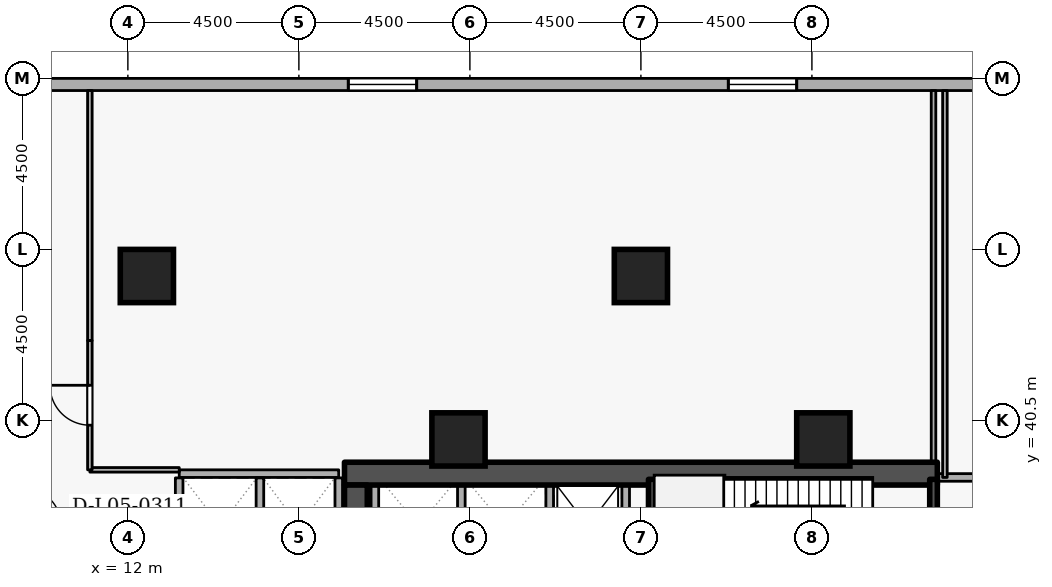
"""IFC4 building model, lengths in metres.
Left out: names, types, materials, properties, quantities, classifications, styles, units other than length and angle.
Written with IfcOpenShell. Run it as: python <this file> out.ifc"""

import sys

from ifc_helpers import new_model, si_unit, direction, frame, frame_2d, origin, origin_2d, place, context, subcontext, project, spatial, rectangle, extrude, element, fill, save


model = new_model("IFC4")
c1 = context("Model", 3, precision=1e-05, world=origin(), true_north=direction((0.0, 1.0)))
c2 = subcontext(c1, "Body", "Model", "MODEL_VIEW")
j1 = project(units=[si_unit("LENGTHUNIT", "METRE"), si_unit("PLANEANGLEUNIT", "RADIAN")], contexts=[c1])
p1 = place(None, origin())
s1 = spatial("IfcSite", under=j1, at=p1, CompositionType="ELEMENT")
p2 = place(p1, origin())
s2 = spatial("IfcBuilding", under=s1, at=p2, CompositionType="ELEMENT")
p3 = place(p2, frame((0.0, 0.0, 23.1)))
s3 = spatial("IfcBuildingStorey", under=s2, at=p3, CompositionType="ELEMENT", Elevation=23.1)
p4 = place(p3, frame((17.7, 39.1, 0.0), z_axis=(0.0, 0.0, 1.0), x_axis=(1.0, 0.0, 0.0)))
e1 = element("IfcWall", 1, at=p4, inside=s3, PredefinedType="SHEAR", context=c2, shape_type="SweptSolid", body=[
    extrude(rectangle(XDim=15.6, YDim=0.6, at=frame_2d((7.8, 0.0))), origin(), (0.0, 0.0, 1.0), 4.8),
])
p5 = place(p3, frame((18.0, 33.1, 0.0), z_axis=(0.0, 0.0, 1.0), x_axis=(0.0, 1.0, 0.0)))
e2 = element("IfcWall", 2, at=p5, inside=s3, PredefinedType="SHEAR", context=c2, shape_type="SweptSolid", body=[
    extrude(rectangle(XDim=5.7, YDim=0.6, at=frame_2d((2.85, 0.0))), origin(), (0.0, 0.0, 1.0), 4.8),
])
for number, where, z_axis, x_axis in (
    (3, (12.5, 44.3, 0.0), (0.0, 0.0, 1.0), (1.0, 0.0, 0.0)),
    (4, (25.5, 44.3, 0.0), (0.0, 0.0, 1.0), (1.0, 0.0, 0.0)),
    (5, (20.7, 40.0, 0.0), (0.0, 0.0, 1.0), (1.0, 0.0, 0.0)),
    (6, (30.3, 40.0, 0.0), (0.0, 0.0, 1.0), (1.0, 0.0, 0.0)),
):
    element("IfcColumn", number, at=place(p3, frame(where, z_axis=z_axis, x_axis=x_axis)), inside=s3, PredefinedType="COLUMN", context=c2, shape_type="SweptSolid", body=[
        extrude(rectangle(XDim=1.4, YDim=1.4, at=origin_2d()), origin(), (0.0, 0.0, 1.0), 4.8),
    ])
p6 = place(p3, frame((42.4, 49.34, 0.0), z_axis=(0.0, 0.0, 1.0), x_axis=(-1.0, 0.0, 0.0)))
e7 = element("IfcWall", 7, at=p6, inside=s3, PredefinedType="STANDARD", context=c2, shape_type="SweptSolid", body=[
    extrude(rectangle(XDim=39.4, YDim=0.32, at=frame_2d((19.7, 0.0))), origin(), (0.0, 0.0, 1.0), 2.84),
])
p7 = place(p6, frame((12.8, 0.0, 0.65)))
e8 = element("IfcOpeningElement", 8, at=p7, cuts=e7, PredefinedType="OPENING", context=c2, shape_type="SweptSolid", body=[
    extrude(rectangle(XDim=1.8, YDim=1.25, at=frame_2d((0.9, 0.625))), frame((0.0, 0.17, 0.0), z_axis=(0.0, -1.0, 0.0), x_axis=(1.0, 0.0, 0.0)), (0.0, 0.0, 1.0), 0.34),
])
p8 = place(p6, frame((22.8, 0.0, 0.65)))
e9 = element("IfcOpeningElement", 9, at=p8, cuts=e7, PredefinedType="OPENING", context=c2, shape_type="SweptSolid", body=[
    extrude(rectangle(XDim=1.8, YDim=1.25, at=frame_2d((0.9, 0.625))), frame((0.0, 0.17, 0.0), z_axis=(0.0, -1.0, 0.0), x_axis=(1.0, 0.0, 0.0)), (0.0, 0.0, 1.0), 0.34),
])
for number, where, z_axis, x_axis in (
    (10, (25.1, 36.352, 0.0), (0.0, 0.0, 1.0), (0.0, 1.0, 0.0)),
    (11, (23.1, 36.352, 0.0), (0.0, 0.0, 1.0), (0.0, 1.0, 0.0)),
    (12, (20.775, 36.352, 0.0), (0.0, 0.0, 1.0), (0.0, 1.0, 0.0)),
    (13, (18.5, 36.352, 0.0), (0.0, 0.0, 1.0), (0.0, 1.0, 0.0)),
):
    element("IfcWall", number, at=place(p3, frame(where, z_axis=z_axis, x_axis=x_axis)), inside=s3, PredefinedType="STANDARD", context=c2, shape_type="SweptSolid", body=[
        extrude(rectangle(XDim=2.436, YDim=0.2, at=frame_2d((1.218, 0.0))), origin(), (0.0, 0.0, 1.0), 4.54),
    ])
p9 = place(p3, frame((13.352, 39.1, 0.0), z_axis=(0.0, 0.0, 1.0), x_axis=(1.0, 0.0, 0.0)))
e14 = element("IfcWall", 14, at=p9, inside=s3, PredefinedType="STANDARD", context=c2, shape_type="SweptSolid", body=[
    extrude(rectangle(XDim=4.196, YDim=0.2, at=frame_2d((2.098, 0.0))), origin(), (0.0, 0.0, 1.0), 4.54),
])
p10 = place(p3, frame((17.55, 36.352, 0.0), z_axis=(0.0, 0.0, 1.0), x_axis=(0.0, 1.0, 0.0)))
e15 = element("IfcWall", 15, at=p10, inside=s3, PredefinedType="STANDARD", context=c2, shape_type="SweptSolid", body=[
    extrude(rectangle(XDim=2.636, YDim=0.2, at=frame_2d((1.318, 0.0))), origin(), (0.0, 0.0, 1.0), 3.745),
])
for number, where, z_axis, x_axis in (
    (16, (15.475, 36.352, 0.0), (0.0, 0.0, 1.0), (0.0, 1.0, 0.0)),
    (17, (13.35, 36.352, 0.0), (0.0, 0.0, 1.0), (0.0, 1.0, 0.0)),
):
    element("IfcWall", number, at=place(p3, frame(where, z_axis=z_axis, x_axis=x_axis)), inside=s3, PredefinedType="STANDARD", context=c2, shape_type="SweptSolid", body=[
        extrude(rectangle(XDim=2.636, YDim=0.2, at=frame_2d((1.318, 0.0))), origin(), (0.0, 0.0, 1.0), 4.54),
    ])
p11 = place(p3, frame((33.2, 38.95, 0.0), z_axis=(0.0, 0.0, 1.0), x_axis=(0.0, -1.0, 0.0)))
e18 = element("IfcWall", 18, at=p11, inside=s3, PredefinedType="SHEAR", context=c2, shape_type="SweptSolid", body=[
    extrude(rectangle(XDim=3.35, YDim=0.2, at=frame_2d((1.675, 0.0))), origin(), (0.0, 0.0, 1.0), 4.8),
])
p12 = place(p11, frame((1.125, 0.0, 0.0)))
e19 = element("IfcOpeningElement", 19, at=p12, cuts=e18, PredefinedType="OPENING", context=c2, shape_type="SweptSolid", body=[
    extrude(rectangle(XDim=1.1, YDim=2.1, at=frame_2d((0.55, 1.05))), frame((0.0, 0.11, 0.0), z_axis=(0.0, -1.0, 0.0), x_axis=(1.0, 0.0, 0.0)), (0.0, 0.0, 1.0), 0.22),
])
p13 = place(p3, frame((25.8, 35.6, 0.0), z_axis=(0.0, 0.0, 1.0), x_axis=(0.0, 1.0, 0.0)))
e20 = element("IfcWall", 20, at=p13, inside=s3, PredefinedType="SHEAR", context=c2, shape_type="SweptSolid", body=[
    extrude(rectangle(XDim=3.35, YDim=0.2, at=frame_2d((1.675, 0.0))), origin(), (0.0, 0.0, 1.0), 4.8),
])
p14 = place(p3, frame((35.8, 39.0, 0.0), z_axis=(0.0, 0.0, 1.0), x_axis=(-1.0, 0.0, 0.0)))
e21 = element("IfcWall", 21, at=p14, inside=s3, PredefinedType="STANDARD", context=c2, shape_type="SweptSolid", body=[
    extrude(rectangle(XDim=2.5, YDim=0.2, at=frame_2d((1.25, 0.0))), origin(), (0.0, 0.0, 1.0), 4.54),
])
p15 = place(p3, frame((33.5, 39.0, 0.0), z_axis=(0.0, 0.0, 1.0), x_axis=(0.0, 1.0, 0.0)))
e22 = element("IfcWall", 22, at=p15, inside=s3, PredefinedType="PARTITIONING", context=c2, shape_type="SweptSolid", body=[
    extrude(rectangle(XDim=10.18, YDim=0.12, at=frame_2d((5.09, 0.0))), origin(), (0.0, 0.0, 1.0), 4.54),
])
p16 = place(p3, frame((11.0, 42.6, 0.0), z_axis=(0.0, 0.0, 1.0), x_axis=(0.0, 1.0, 0.0)))
e23 = element("IfcWall", 23, at=p16, inside=s3, PredefinedType="PARTITIONING", context=c2, shape_type="SweptSolid", body=[
    extrude(rectangle(XDim=6.58, YDim=0.12, at=frame_2d((3.29, 0.0))), origin(), (0.0, 0.0, 1.0), 4.54),
])
p17 = place(p3, frame((33.2, 49.18, 0.0), z_axis=(0.0, 0.0, 1.0), x_axis=(0.0, -1.0, 0.0)))
e24 = element("IfcWall", 24, at=p17, inside=s3, PredefinedType="PARTITIONING", context=c2, shape_type="SweptSolid", body=[
    extrude(rectangle(XDim=9.98, YDim=0.12, at=frame_2d((4.99, 0.0))), origin(), (0.0, 0.0, 1.0), 4.54),
])
p18 = place(p3, frame((13.352, 39.2, 0.0), z_axis=(0.0, 0.0, 1.0), x_axis=(-1.0, 0.0, 0.0)))
e25 = element("IfcWall", 25, at=p18, inside=s3, PredefinedType="PARTITIONING", context=c2, shape_type="SweptSolid", body=[
    extrude(rectangle(XDim=2.352, YDim=0.12, at=frame_2d((1.176, 0.0))), origin(), (0.0, 0.0, 1.0), 4.54),
])
p19 = place(p3, frame((11.0, 39.2, 0.0), z_axis=(0.0, 0.0, 1.0), x_axis=(0.0, 1.0, 0.0)))
e26 = element("IfcWall", 26, at=p19, inside=s3, PredefinedType="PARTITIONING", context=c2, shape_type="SweptSolid", body=[
    extrude(rectangle(XDim=3.4, YDim=0.12, at=frame_2d((1.7, 0.0))), origin(), (0.0, 0.0, 1.0), 4.54),
])
p20 = place(p19, frame((1.175, 0.0, 0.0)))
e27 = element("IfcOpeningElement", 27, at=p20, cuts=e26, PredefinedType="OPENING", context=c2, shape_type="SweptSolid", body=[
    extrude(rectangle(XDim=1.05, YDim=2.1, at=frame_2d((0.525, 1.05))), frame((0.0, 0.07, 0.0), z_axis=(0.0, -1.0, 0.0), x_axis=(1.0, 0.0, 0.0)), (0.0, 0.0, 1.0), 0.14),
])
p21 = place(p7, origin())
e28 = element("IfcWindow", 28, at=p21, inside=s3, PartitioningType="SINGLE_PANEL", PredefinedType="WINDOW", context=c2, shape_type="SweptSolid", body=[
    extrude(rectangle(XDim=1.8, YDim=1.25, at=frame_2d((0.9, 0.625))), frame((0.0, 0.03, 0.0), z_axis=(0.0, -1.0, 0.0), x_axis=(1.0, 0.0, 0.0)), (0.0, 0.0, 1.0), 0.06),
])
fill(e8, e28)
p22 = place(p8, origin())
e29 = element("IfcWindow", 29, at=p22, inside=s3, PartitioningType="SINGLE_PANEL", PredefinedType="WINDOW", context=c2, shape_type="SweptSolid", body=[
    extrude(rectangle(XDim=1.8, YDim=1.25, at=frame_2d((0.9, 0.625))), frame((0.0, 0.03, 0.0), z_axis=(0.0, -1.0, 0.0), x_axis=(1.0, 0.0, 0.0)), (0.0, 0.0, 1.0), 0.06),
])
fill(e9, e29)
p23 = place(p20, origin())
e30 = element("IfcDoor", 30, at=p23, inside=s3, OperationType="SINGLE_SWING_RIGHT", PredefinedType="DOOR", context=c2, shape_type="SweptSolid", body=[
    extrude(rectangle(XDim=1.05, YDim=2.1, at=frame_2d((0.525, 1.05))), frame((0.0, 0.025, 0.0), z_axis=(0.0, -1.0, 0.0), x_axis=(1.0, 0.0, 0.0)), (0.0, 0.0, 1.0), 0.05),
])
fill(e27, e30)
save(model, sys.argv[1])
